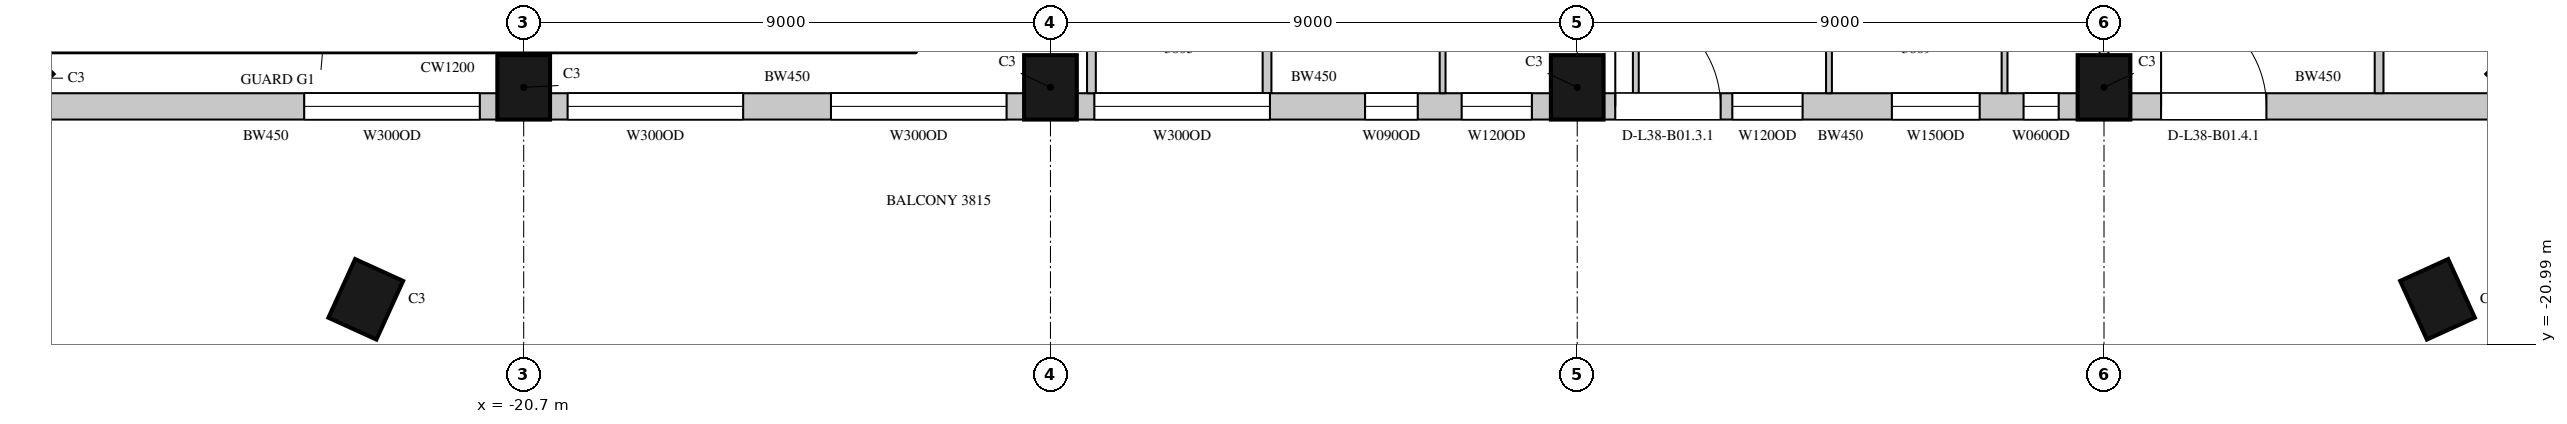
"""IFC4 building model, lengths in metres.
Left out: names, types, materials, properties, quantities, classifications, styles, units other than length and angle.
Written with IfcOpenShell. Run it as: python <this file> out.ifc"""

import sys

from ifc_helpers import new_model, si_unit, direction, frame, frame_2d, origin, origin_2d, place, context, subcontext, project, spatial, rectangle, extrude, element, fill, save


model = new_model("IFC4")
c1 = context("Model", 3, precision=1e-05, world=origin(), true_north=direction((0.0, 1.0)))
c2 = subcontext(c1, "Body", "Model", "MODEL_VIEW")
j1 = project(units=[si_unit("LENGTHUNIT", "METRE"), si_unit("PLANEANGLEUNIT", "RADIAN")], contexts=[c1])
p1 = place(None, origin())
s1 = spatial("IfcSite", under=j1, at=p1, CompositionType="ELEMENT")
p2 = place(p1, origin())
s2 = spatial("IfcBuilding", under=s1, at=p2, CompositionType="ELEMENT")
p3 = place(p2, frame((0.0, 0.0, 176.9)))
s3 = spatial("IfcBuildingStorey", under=s2, at=p3, CompositionType="ELEMENT", Elevation=176.9)
for number, where, z_axis, x_axis in (
    (1, (-29.443, -16.443, 0.0), (0.0, 0.0, 1.0), (0.707, -0.707, 0.0)),
    (2, (-20.7, -16.6, 0.0), (0.0, 0.0, 1.0), (1.0, 0.0, 0.0)),
    (3, (-11.7, -16.6, 0.0), (0.0, 0.0, 1.0), (1.0, 0.0, 0.0)),
    (4, (-2.7, -16.6, 0.0), (0.0, 0.0, 1.0), (1.0, 0.0, 0.0)),
    (5, (6.3, -16.6, 0.0), (0.0, 0.0, 1.0), (1.0, 0.0, 0.0)),
    (6, (13.543, -16.443, 0.0), (0.0, 0.0, 1.0), (0.707, 0.707, 0.0)),
    (7, (-23.398, -20.221, 0.0), (0.0, 0.0, 1.0), (0.91, -0.415, 0.0)),
    (8, (11.998, -20.221, 0.0), (0.0, 0.0, 1.0), (0.91, 0.415, 0.0)),
):
    element("IfcColumn", number, at=place(p3, frame(where, z_axis=z_axis, x_axis=x_axis)), inside=s3, PredefinedType="COLUMN", context=c2, shape_type="SweptSolid", body=[
        extrude(rectangle(XDim=0.9, YDim=1.1, at=origin_2d()), origin(), (0.0, 0.0, 1.0), 4.1),
    ])
p4 = place(p3, frame((-29.064, -16.925, 0.0), z_axis=(0.0, 0.0, 1.0), x_axis=(1.0, 0.0, 0.0)))
e9 = element("IfcWall", 9, at=p4, inside=s3, PredefinedType="SOLIDWALL", context=c2, shape_type="SweptSolid", body=[
    extrude(rectangle(XDim=7.914, YDim=0.45, at=frame_2d((3.957, 0.0))), origin(), (0.0, 0.0, 1.0), 3.8),
])
p5 = place(p4, frame((4.614, 0.0, 1.05)))
e10 = element("IfcOpeningElement", 10, at=p5, cuts=e9, PredefinedType="OPENING", context=c2, shape_type="SweptSolid", body=[
    extrude(rectangle(XDim=3.0, YDim=2.4, at=frame_2d((1.5, 1.2))), frame((0.0, 0.235, 0.0), z_axis=(0.0, -1.0, 0.0), x_axis=(1.0, 0.0, 0.0)), (0.0, 0.0, 1.0), 0.47),
])
p6 = place(p3, frame((-20.25, -16.925, 0.0), z_axis=(0.0, 0.0, 1.0), x_axis=(1.0, 0.0, 0.0)))
e11 = element("IfcWall", 11, at=p6, inside=s3, PredefinedType="SOLIDWALL", context=c2, shape_type="SweptSolid", body=[
    extrude(rectangle(XDim=8.1, YDim=0.45, at=frame_2d((4.05, 0.0))), origin(), (0.0, 0.0, 1.0), 3.8),
])
p7 = place(p6, frame((0.3, 0.0, 1.05)))
e12 = element("IfcOpeningElement", 12, at=p7, cuts=e11, PredefinedType="OPENING", context=c2, shape_type="SweptSolid", body=[
    extrude(rectangle(XDim=3.0, YDim=2.4, at=frame_2d((1.5, 1.2))), frame((0.0, 0.235, 0.0), z_axis=(0.0, -1.0, 0.0), x_axis=(1.0, 0.0, 0.0)), (0.0, 0.0, 1.0), 0.47),
])
p8 = place(p6, frame((4.8, 0.0, 1.05)))
e13 = element("IfcOpeningElement", 13, at=p8, cuts=e11, PredefinedType="OPENING", context=c2, shape_type="SweptSolid", body=[
    extrude(rectangle(XDim=3.0, YDim=2.4, at=frame_2d((1.5, 1.2))), frame((0.0, 0.235, 0.0), z_axis=(0.0, -1.0, 0.0), x_axis=(1.0, 0.0, 0.0)), (0.0, 0.0, 1.0), 0.47),
])
p9 = place(p3, frame((-11.25, -16.925, 0.0), z_axis=(0.0, 0.0, 1.0), x_axis=(1.0, 0.0, 0.0)))
e14 = element("IfcWall", 14, at=p9, inside=s3, PredefinedType="SOLIDWALL", context=c2, shape_type="SweptSolid", body=[
    extrude(rectangle(XDim=8.1, YDim=0.45, at=frame_2d((4.05, 0.0))), origin(), (0.0, 0.0, 1.0), 3.8),
])
p10 = place(p9, frame((0.3, 0.0, 1.05)))
e15 = element("IfcOpeningElement", 15, at=p10, cuts=e14, PredefinedType="OPENING", context=c2, shape_type="SweptSolid", body=[
    extrude(rectangle(XDim=3.0, YDim=2.4, at=frame_2d((1.5, 1.2))), frame((0.0, 0.235, 0.0), z_axis=(0.0, -1.0, 0.0), x_axis=(1.0, 0.0, 0.0)), (0.0, 0.0, 1.0), 0.47),
])
p11 = place(p9, frame((4.925, 0.0, 1.05)))
e16 = element("IfcOpeningElement", 16, at=p11, cuts=e14, PredefinedType="OPENING", context=c2, shape_type="SweptSolid", body=[
    extrude(rectangle(XDim=0.9, YDim=2.4, at=frame_2d((0.45, 1.2))), frame((0.0, 0.235, 0.0), z_axis=(0.0, -1.0, 0.0), x_axis=(1.0, 0.0, 0.0)), (0.0, 0.0, 1.0), 0.47),
])
p12 = place(p9, frame((6.575, 0.0, 1.05)))
e17 = element("IfcOpeningElement", 17, at=p12, cuts=e14, PredefinedType="OPENING", context=c2, shape_type="SweptSolid", body=[
    extrude(rectangle(XDim=1.2, YDim=2.4, at=frame_2d((0.6, 1.2))), frame((0.0, 0.235, 0.0), z_axis=(0.0, -1.0, 0.0), x_axis=(1.0, 0.0, 0.0)), (0.0, 0.0, 1.0), 0.47),
])
p13 = place(p3, frame((-2.25, -16.925, 0.0), z_axis=(0.0, 0.0, 1.0), x_axis=(1.0, 0.0, 0.0)))
e18 = element("IfcWall", 18, at=p13, inside=s3, PredefinedType="SOLIDWALL", context=c2, shape_type="SweptSolid", body=[
    extrude(rectangle(XDim=8.1, YDim=0.45, at=frame_2d((4.05, 0.0))), origin(), (0.0, 0.0, 1.0), 3.8),
])
p14 = place(p13, frame((0.2, 0.0, 0.0)))
e19 = element("IfcOpeningElement", 19, at=p14, cuts=e18, PredefinedType="OPENING", context=c2, shape_type="SweptSolid", body=[
    extrude(rectangle(XDim=1.8, YDim=2.4, at=frame_2d((0.9, 1.2))), frame((0.0, 0.235, 0.0), z_axis=(0.0, -1.0, 0.0), x_axis=(1.0, 0.0, 0.0)), (0.0, 0.0, 1.0), 0.47),
])
p15 = place(p13, frame((2.2, 0.0, 1.05)))
e20 = element("IfcOpeningElement", 20, at=p15, cuts=e18, PredefinedType="OPENING", context=c2, shape_type="SweptSolid", body=[
    extrude(rectangle(XDim=1.2, YDim=2.4, at=frame_2d((0.6, 1.2))), frame((0.0, 0.235, 0.0), z_axis=(0.0, -1.0, 0.0), x_axis=(1.0, 0.0, 0.0)), (0.0, 0.0, 1.0), 0.47),
])
p16 = place(p13, frame((4.926, 0.0, 1.05)))
e21 = element("IfcOpeningElement", 21, at=p16, cuts=e18, PredefinedType="OPENING", context=c2, shape_type="SweptSolid", body=[
    extrude(rectangle(XDim=1.5, YDim=2.4, at=frame_2d((0.75, 1.2))), frame((0.0, 0.235, 0.0), z_axis=(0.0, -1.0, 0.0), x_axis=(1.0, 0.0, 0.0)), (0.0, 0.0, 1.0), 0.47),
])
p17 = place(p13, frame((7.176, 0.0, 1.05)))
e22 = element("IfcOpeningElement", 22, at=p17, cuts=e18, PredefinedType="OPENING", context=c2, shape_type="SweptSolid", body=[
    extrude(rectangle(XDim=0.6, YDim=2.4, at=frame_2d((0.3, 1.2))), frame((0.0, 0.235, 0.0), z_axis=(0.0, -1.0, 0.0), x_axis=(1.0, 0.0, 0.0)), (0.0, 0.0, 1.0), 0.47),
])
p18 = place(p3, frame((6.75, -16.925, 0.0), z_axis=(0.0, 0.0, 1.0), x_axis=(1.0, 0.0, 0.0)))
e23 = element("IfcWall", 23, at=p18, inside=s3, PredefinedType="SOLIDWALL", context=c2, shape_type="SweptSolid", body=[
    extrude(rectangle(XDim=6.414, YDim=0.45, at=frame_2d((3.207, 0.0))), origin(), (0.0, 0.0, 1.0), 3.8),
])
p19 = place(p18, frame((0.525, 0.0, 0.0)))
e24 = element("IfcOpeningElement", 24, at=p19, cuts=e23, PredefinedType="OPENING", context=c2, shape_type="SweptSolid", body=[
    extrude(rectangle(XDim=1.8, YDim=2.4, at=frame_2d((0.9, 1.2))), frame((0.0, 0.235, 0.0), z_axis=(0.0, -1.0, 0.0), x_axis=(1.0, 0.0, 0.0)), (0.0, 0.0, 1.0), 0.47),
])
p20 = place(p3, frame((-19.63, -18.0, 0.0), z_axis=(0.0, 0.0, 1.0), x_axis=(1.0, 0.0, 0.0)))
e25 = element("IfcWall", 25, at=p20, inside=s3, PredefinedType="SOLIDWALL", context=c2, shape_type="SweptSolid", body=[
    extrude(rectangle(XDim=3.56, YDim=0.45, at=frame_2d((1.78, 0.0))), origin(), (0.0, 0.0, 1.0), 0.6),
])
for number, where, z_axis, x_axis in (
    (26, (-15.77, -18.0, 0.0), (0.0, 0.0, 1.0), (1.0, 0.0, 0.0)),
    (27, (-11.81, -18.0, 0.0), (0.0, 0.0, 1.0), (1.0, 0.0, 0.0)),
    (28, (0.07, -18.0, 0.0), (0.0, 0.0, 1.0), (1.0, 0.0, 0.0)),
):
    element("IfcWall", number, at=place(p3, frame(where, z_axis=z_axis, x_axis=x_axis)), inside=s3, PredefinedType="SOLIDWALL", context=c2, shape_type="SweptSolid", body=[
        extrude(rectangle(XDim=3.76, YDim=0.45, at=frame_2d((1.88, 0.0))), origin(), (0.0, 0.0, 1.0), 0.6),
    ])
p21 = place(p3, frame((4.03, -18.0, 0.0), z_axis=(0.0, 0.0, 1.0), x_axis=(1.0, 0.0, 0.0)))
e29 = element("IfcWall", 29, at=p21, inside=s3, PredefinedType="SOLIDWALL", context=c2, shape_type="SweptSolid", body=[
    extrude(rectangle(XDim=2.945, YDim=0.45, at=frame_2d((1.473, 0.0))), origin(), (0.0, 0.0, 1.0), 0.6),
])
p22 = place(p3, frame((-11.0, -16.7, 0.0), z_axis=(0.0, 0.0, 1.0), x_axis=(0.0, 1.0, 0.0)))
e30 = element("IfcWall", 30, at=p22, inside=s3, PredefinedType="PARTITIONING", context=c2, shape_type="SweptSolid", body=[
    extrude(rectangle(XDim=1.88, YDim=0.15, at=frame_2d((0.94, 0.0))), origin(), (0.0, 0.0, 1.0), 3.8),
])
p23 = place(p3, frame((-8.0, -16.7, 0.0), z_axis=(0.0, 0.0, 1.0), x_axis=(0.0, 1.0, 0.0)))
e31 = element("IfcWall", 31, at=p23, inside=s3, PredefinedType="PARTITIONING", context=c2, shape_type="SweptSolid", body=[
    extrude(rectangle(XDim=4.6, YDim=0.15, at=frame_2d((2.3, 0.0))), origin(), (0.0, 0.0, 1.0), 3.8),
])
p24 = place(p3, frame((6.3, -16.05, 0.0), z_axis=(0.0, 0.0, 1.0), x_axis=(0.0, 1.0, 0.0)))
e32 = element("IfcWall", 32, at=p24, inside=s3, PredefinedType="PARTITIONING", context=c2, shape_type="SweptSolid", body=[
    extrude(rectangle(XDim=3.95, YDim=0.15, at=frame_2d((1.975, 0.0))), origin(), (0.0, 0.0, 1.0), 3.25),
])
p25 = place(p3, frame((11.0, -16.7, 0.0), z_axis=(0.0, 0.0, 1.0), x_axis=(0.0, 1.0, 0.0)))
e33 = element("IfcWall", 33, at=p25, inside=s3, PredefinedType="PARTITIONING", context=c2, shape_type="SweptSolid", body=[
    extrude(rectangle(XDim=4.7, YDim=0.15, at=frame_2d((2.35, 0.0))), origin(), (0.0, 0.0, 1.0), 3.8),
])
for number, where, z_axis, x_axis in (
    (34, (-5.0, -16.7, 0.0), (0.0, 0.0, 1.0), (0.0, 1.0, 0.0)),
    (35, (-1.699, -16.7, 0.0), (0.0, 0.0, 1.0), (0.0, 1.0, 0.0)),
):
    element("IfcWall", number, at=place(p3, frame(where, z_axis=z_axis, x_axis=x_axis)), inside=s3, PredefinedType="PARTITIONING", context=c2, shape_type="SweptSolid", body=[
        extrude(rectangle(XDim=4.6, YDim=0.1, at=frame_2d((2.3, 0.0))), origin(), (0.0, 0.0, 1.0), 3.8),
    ])
p26 = place(p3, frame((1.601, -16.7, 0.0), z_axis=(0.0, 0.0, 1.0), x_axis=(0.0, 1.0, 0.0)))
e36 = element("IfcWall", 36, at=p26, inside=s3, PredefinedType="PARTITIONING", context=c2, shape_type="SweptSolid", body=[
    extrude(rectangle(XDim=4.6, YDim=0.1, at=frame_2d((2.3, 0.0))), origin(), (0.0, 0.0, 1.0), 3.15),
])
p27 = place(p3, frame((4.601, -16.7, 0.0), z_axis=(0.0, 0.0, 1.0), x_axis=(0.0, 1.0, 0.0)))
e37 = element("IfcWall", 37, at=p27, inside=s3, PredefinedType="PARTITIONING", context=c2, shape_type="SweptSolid", body=[
    extrude(rectangle(XDim=4.6, YDim=0.1, at=frame_2d((2.3, 0.0))), origin(), (0.0, 0.0, 1.0), 3.8),
])
p28 = place(p5, origin())
e38 = element("IfcWindow", 38, at=p28, inside=s3, PartitioningType="SINGLE_PANEL", PredefinedType="WINDOW", context=c2, shape_type="SweptSolid", body=[
    extrude(rectangle(XDim=3.0, YDim=2.4, at=frame_2d((1.5, 1.2))), frame((0.0, 0.135, 0.0), z_axis=(0.0, -1.0, 0.0), x_axis=(1.0, 0.0, 0.0)), (0.0, 0.0, 1.0), 0.06),
])
fill(e10, e38)
p29 = place(p7, origin())
e39 = element("IfcWindow", 39, at=p29, inside=s3, PartitioningType="SINGLE_PANEL", PredefinedType="WINDOW", context=c2, shape_type="SweptSolid", body=[
    extrude(rectangle(XDim=3.0, YDim=2.4, at=frame_2d((1.5, 1.2))), frame((0.0, 0.135, 0.0), z_axis=(0.0, -1.0, 0.0), x_axis=(1.0, 0.0, 0.0)), (0.0, 0.0, 1.0), 0.06),
])
fill(e12, e39)
p30 = place(p8, origin())
e40 = element("IfcWindow", 40, at=p30, inside=s3, PartitioningType="SINGLE_PANEL", PredefinedType="WINDOW", context=c2, shape_type="SweptSolid", body=[
    extrude(rectangle(XDim=3.0, YDim=2.4, at=frame_2d((1.5, 1.2))), frame((0.0, 0.135, 0.0), z_axis=(0.0, -1.0, 0.0), x_axis=(1.0, 0.0, 0.0)), (0.0, 0.0, 1.0), 0.06),
])
fill(e13, e40)
p31 = place(p10, origin())
e41 = element("IfcWindow", 41, at=p31, inside=s3, PartitioningType="SINGLE_PANEL", PredefinedType="WINDOW", context=c2, shape_type="SweptSolid", body=[
    extrude(rectangle(XDim=3.0, YDim=2.4, at=frame_2d((1.5, 1.2))), frame((0.0, 0.135, 0.0), z_axis=(0.0, -1.0, 0.0), x_axis=(1.0, 0.0, 0.0)), (0.0, 0.0, 1.0), 0.06),
])
fill(e15, e41)
p32 = place(p14, origin())
e42 = element("IfcDoor", 42, at=p32, inside=s3, OperationType="SLIDING_TO_LEFT", PredefinedType="DOOR", context=c2, shape_type="SweptSolid", body=[
    extrude(rectangle(XDim=1.8, YDim=2.4, at=frame_2d((0.9, 1.2))), frame((0.0, 0.13, 0.0), z_axis=(0.0, -1.0, 0.0), x_axis=(1.0, 0.0, 0.0)), (0.0, 0.0, 1.0), 0.05),
])
fill(e19, e42)
p33 = place(p15, origin())
e43 = element("IfcWindow", 43, at=p33, inside=s3, PartitioningType="SINGLE_PANEL", PredefinedType="WINDOW", context=c2, shape_type="SweptSolid", body=[
    extrude(rectangle(XDim=1.2, YDim=2.4, at=frame_2d((0.6, 1.2))), frame((0.0, 0.135, 0.0), z_axis=(0.0, -1.0, 0.0), x_axis=(1.0, 0.0, 0.0)), (0.0, 0.0, 1.0), 0.06),
])
fill(e20, e43)
p34 = place(p19, origin())
e44 = element("IfcDoor", 44, at=p34, inside=s3, OperationType="SLIDING_TO_LEFT", PredefinedType="DOOR", context=c2, shape_type="SweptSolid", body=[
    extrude(rectangle(XDim=1.8, YDim=2.4, at=frame_2d((0.9, 1.2))), frame((0.0, 0.13, 0.0), z_axis=(0.0, -1.0, 0.0), x_axis=(1.0, 0.0, 0.0)), (0.0, 0.0, 1.0), 0.05),
])
fill(e24, e44)
p35 = place(p11, origin())
e45 = element("IfcWindow", 45, at=p35, inside=s3, PartitioningType="SINGLE_PANEL", PredefinedType="WINDOW", context=c2, shape_type="SweptSolid", body=[
    extrude(rectangle(XDim=0.9, YDim=2.4, at=frame_2d((0.45, 1.2))), frame((0.0, 0.135, 0.0), z_axis=(0.0, -1.0, 0.0), x_axis=(1.0, 0.0, 0.0)), (0.0, 0.0, 1.0), 0.06),
])
fill(e16, e45)
p36 = place(p12, origin())
e46 = element("IfcWindow", 46, at=p36, inside=s3, PartitioningType="SINGLE_PANEL", PredefinedType="WINDOW", context=c2, shape_type="SweptSolid", body=[
    extrude(rectangle(XDim=1.2, YDim=2.4, at=frame_2d((0.6, 1.2))), frame((0.0, 0.135, 0.0), z_axis=(0.0, -1.0, 0.0), x_axis=(1.0, 0.0, 0.0)), (0.0, 0.0, 1.0), 0.06),
])
fill(e17, e46)
p37 = place(p16, origin())
e47 = element("IfcWindow", 47, at=p37, inside=s3, PartitioningType="SINGLE_PANEL", PredefinedType="WINDOW", context=c2, shape_type="SweptSolid", body=[
    extrude(rectangle(XDim=1.5, YDim=2.4, at=frame_2d((0.75, 1.2))), frame((0.0, 0.135, 0.0), z_axis=(0.0, -1.0, 0.0), x_axis=(1.0, 0.0, 0.0)), (0.0, 0.0, 1.0), 0.06),
])
fill(e21, e47)
p38 = place(p17, origin())
e48 = element("IfcWindow", 48, at=p38, inside=s3, PartitioningType="SINGLE_PANEL", PredefinedType="WINDOW", context=c2, shape_type="SweptSolid", body=[
    extrude(rectangle(XDim=0.6, YDim=2.4, at=frame_2d((0.3, 1.2))), frame((0.0, 0.135, 0.0), z_axis=(0.0, -1.0, 0.0), x_axis=(1.0, 0.0, 0.0)), (0.0, 0.0, 1.0), 0.06),
])
fill(e22, e48)
save(model, sys.argv[1])
